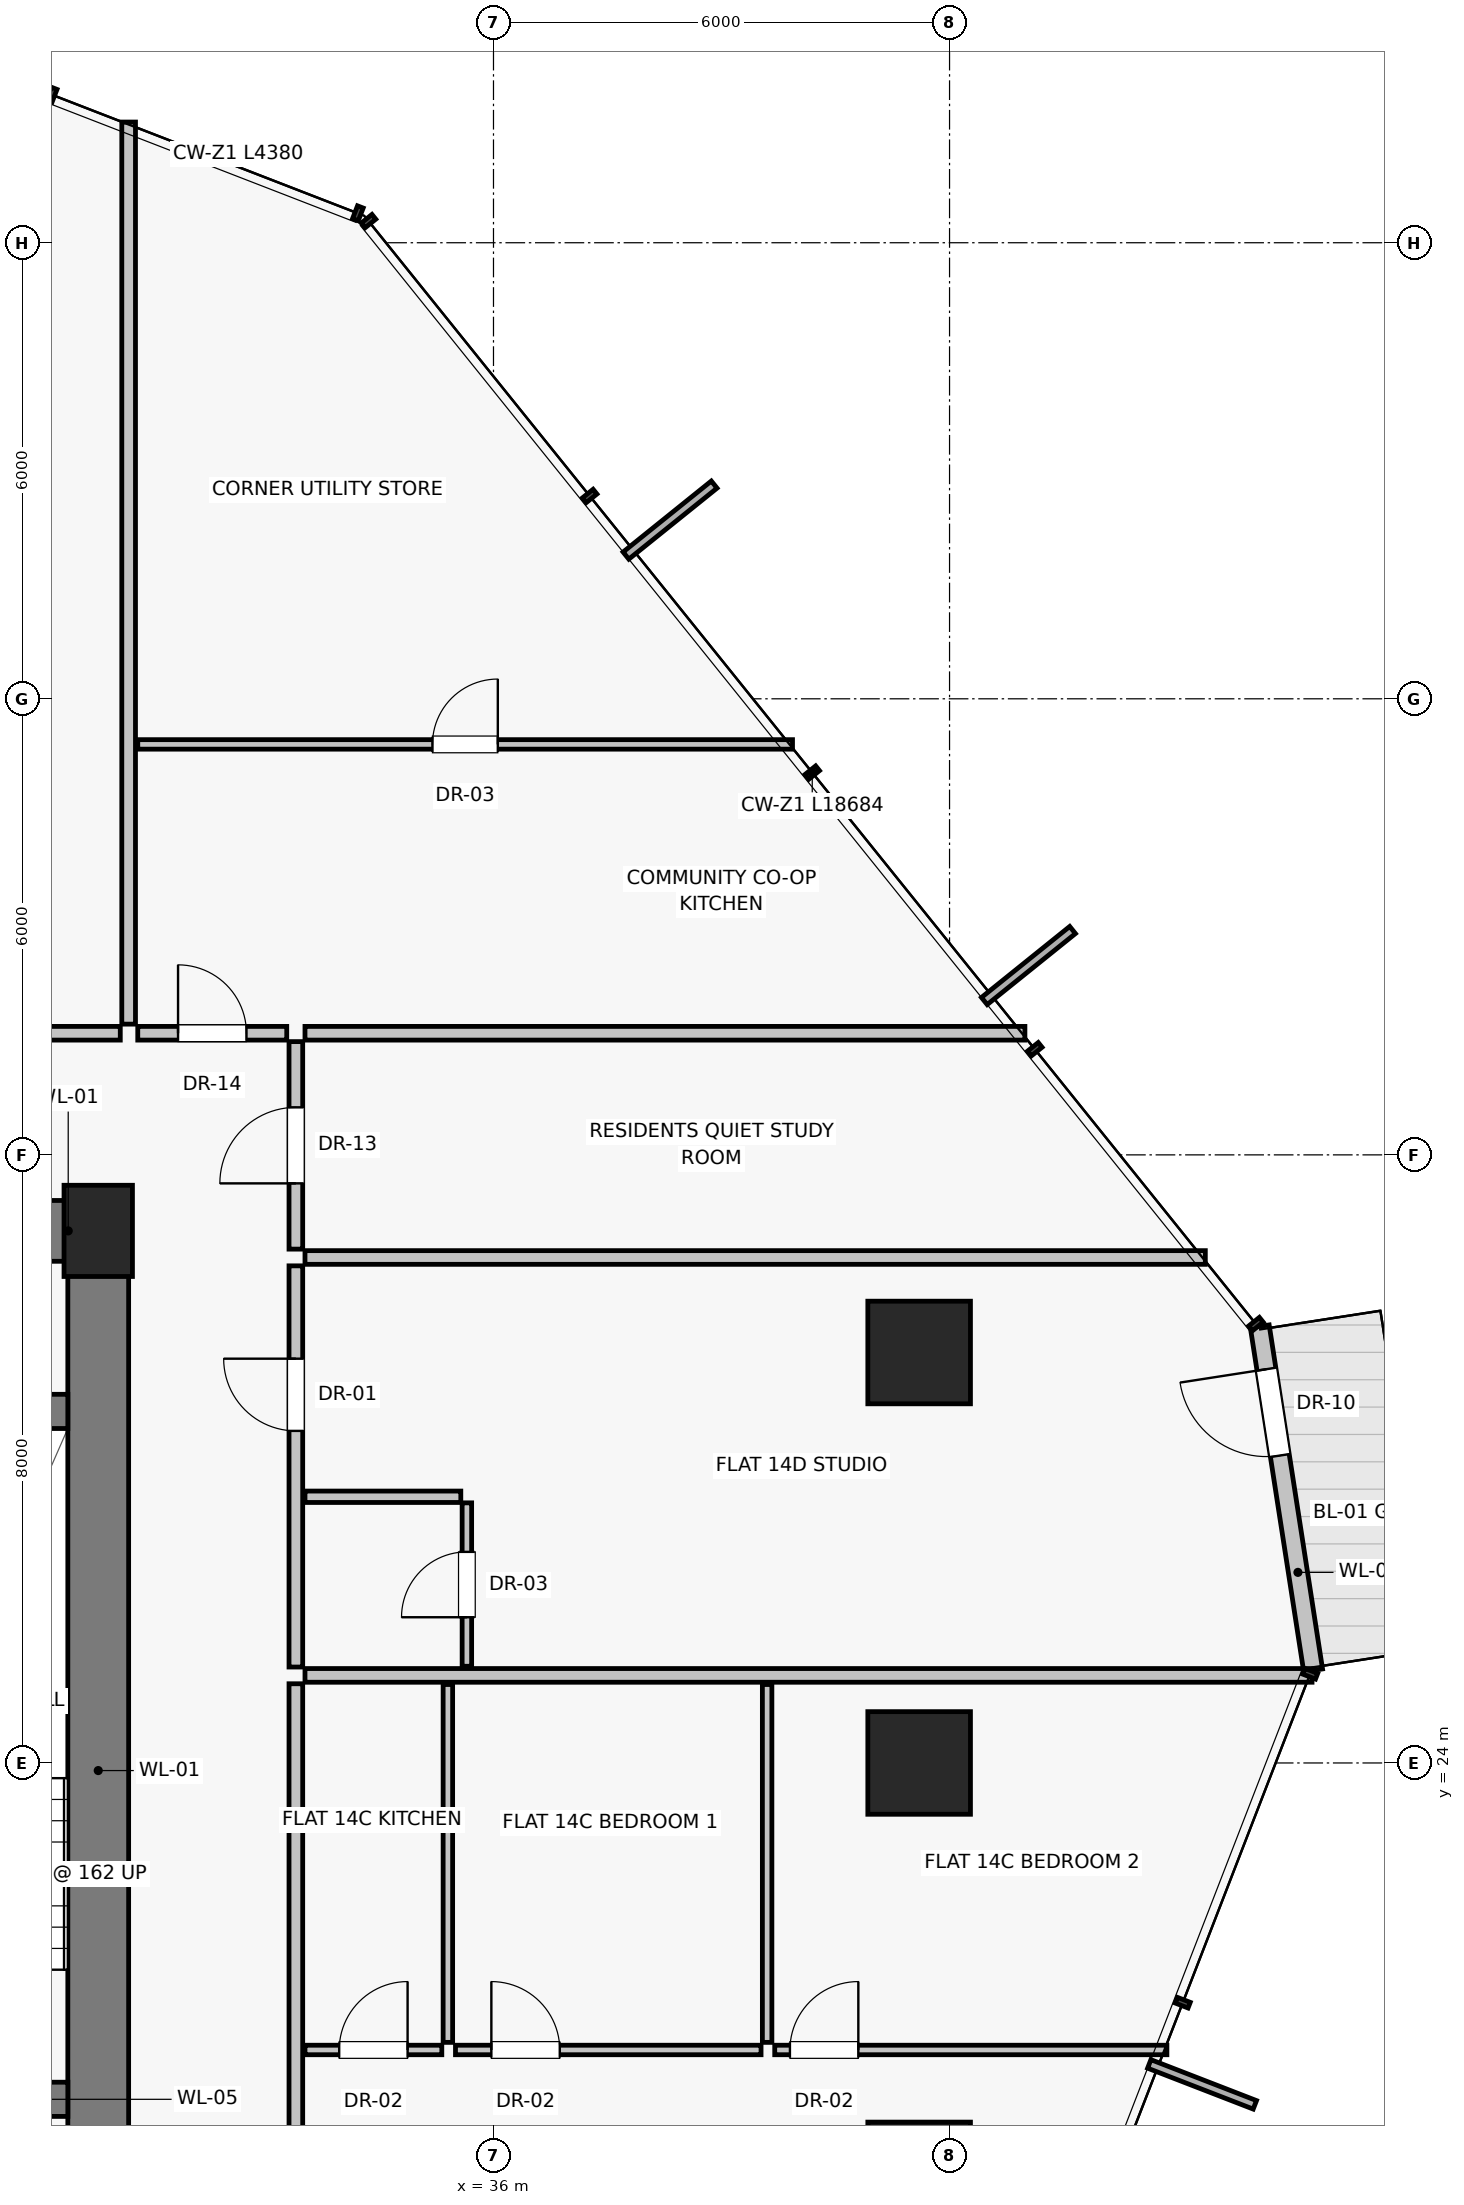
"""IFC4 building model, lengths in metres.
Left out: names, types, materials, properties, quantities, classifications, styles, units other than length and angle.
Written with IfcOpenShell. Run it as: python <this file> out.ifc"""

import sys

from ifc_helpers import new_model, si_unit, direction, frame, frame_2d, origin, origin_2d, place, context, subcontext, project, spatial, rectangle, extrude, source, transform, mapped, element, fill, save


model = new_model("IFC4")
c1 = context("Model", 3, precision=1e-05, world=origin(), true_north=direction((0.0, 1.0)))
c2 = subcontext(c1, "Body", "Model", "MODEL_VIEW")
j1 = project(units=[si_unit("LENGTHUNIT", "METRE"), si_unit("PLANEANGLEUNIT", "RADIAN")], contexts=[c1])
p1 = place(None, origin())
s1 = spatial("IfcSite", under=j1, at=p1, CompositionType="ELEMENT")
p2 = place(p1, origin())
s2 = spatial("IfcBuilding", under=s1, at=p2, CompositionType="ELEMENT")
p3 = place(p2, frame((0.0, 0.0, 53.3)))
s3 = spatial("IfcBuildingStorey", under=s2, at=p3, CompositionType="ELEMENT", Elevation=53.3)
p4 = place(p3, frame((30.8, 31.0, 0.0), z_axis=(0.0, 0.0, 1.0), x_axis=(1.0, 0.0, 0.0)))
e1 = element("IfcColumn", 1, at=p4, inside=s3, PredefinedType="PILASTER", context=c2, shape_type="SweptSolid", body=[
    extrude(rectangle(XDim=0.9, YDim=1.2, at=origin_2d()), origin(), (0.0, 0.0, 1.0), 3.25),
])
for number, where, z_axis, x_axis in (
    (2, (41.6, 18.6, 0.0), (0.0, 0.0, 1.0), (1.0, 0.0, 0.0)),
    (3, (41.6, 24.0, 0.0), (0.0, 0.0, 1.0), (1.0, 0.0, 0.0)),
    (4, (41.6, 29.4, 0.0), (0.0, 0.0, 1.0), (1.0, 0.0, 0.0)),
):
    element("IfcColumn", number, at=place(p3, frame(where, z_axis=z_axis, x_axis=x_axis)), inside=s3, PredefinedType="COLUMN", context=c2, shape_type="SweptSolid", body=[
        extrude(rectangle(XDim=1.35, YDim=1.35, at=origin_2d()), origin(), (0.0, 0.0, 1.0), 3.25),
    ])
p5 = place(p3, frame((46.784, 25.218, 0.0), z_axis=(0.0, 0.0, 1.0), x_axis=(-0.153366947005, 0.988169307136, 0.0)))
e5 = element("IfcWall", 5, at=p5, inside=s3, PredefinedType="SOLIDWALL", context=c2, shape_type="SweptSolid", body=[
    extrude(rectangle(XDim=4.58, YDim=0.25, at=frame_2d((2.29, 0.0))), origin(), (0.0, 0.0, 1.0), 2.97),
])
p6 = place(p5, frame((2.86, 0.0, 0.0)))
e6 = element("IfcOpeningElement", 6, at=p6, cuts=e5, PredefinedType="OPENING", context=c2, shape_type="SweptSolid", body=[
    extrude(rectangle(XDim=1.15, YDim=2.25, at=frame_2d((0.575, 1.125))), frame((0.0, 0.135, 0.0), z_axis=(0.0, -1.0, 0.0), x_axis=(1.0, 0.0, 0.0)), (0.0, 0.0, 1.0), 0.27),
])
p7 = place(p3, frame((30.8, 16.8, 0.0), z_axis=(0.0, 0.0, 1.0), x_axis=(0.0, 1.0, 0.0)))
e7 = element("IfcWall", 7, at=p7, inside=s3, PredefinedType="SHEAR", context=c2, shape_type="SweptSolid", body=[
    extrude(rectangle(XDim=14.2, YDim=0.8, at=frame_2d((7.1, 0.0))), origin(), (0.0, 0.0, 1.0), 2.97),
])
p8 = place(p3, frame((27.0, 31.0, 0.0), z_axis=(0.0, 0.0, 1.0), x_axis=(1.0, 0.0, 0.0)))
e8 = element("IfcWall", 8, at=p8, inside=s3, PredefinedType="SHEAR", context=c2, shape_type="SweptSolid", body=[
    extrude(rectangle(XDim=3.8, YDim=0.8, at=frame_2d((1.9, 0.0))), origin(), (0.0, 0.0, 1.0), 2.97),
])
p9 = place(p8, frame((0.45, 0.0, 0.0)))
e9 = element("IfcOpeningElement", 9, at=p9, cuts=e8, PredefinedType="OPENING", context=c2, shape_type="SweptSolid", body=[
    extrude(rectangle(XDim=0.86, YDim=2.01, at=frame_2d((0.43, 1.005))), frame((0.0, 0.41, 0.0), z_axis=(0.0, -1.0, 0.0), x_axis=(1.0, 0.0, 0.0)), (0.0, 0.0, 1.0), 0.82),
])
p10 = place(p8, frame((1.9, 0.0, 0.0)))
e10 = element("IfcOpeningElement", 10, at=p10, cuts=e8, PredefinedType="OPENING", context=c2, shape_type="SweptSolid", body=[
    extrude(rectangle(XDim=0.86, YDim=2.01, at=frame_2d((0.43, 1.005))), frame((0.0, 0.41, 0.0), z_axis=(0.0, -1.0, 0.0), x_axis=(1.0, 0.0, 0.0)), (0.0, 0.0, 1.0), 0.82),
])
p11 = place(p3, frame((26.975, 19.575, 0.0), z_axis=(0.0, 0.0, 1.0), x_axis=(1.0, 0.0, 0.0)))
e11 = element("IfcWall", 11, at=p11, inside=s3, PredefinedType="SHEAR", context=c2, shape_type="SweptSolid", body=[
    extrude(rectangle(XDim=3.425, YDim=0.45, at=frame_2d((1.712, 0.0))), origin(), (0.0, 0.0, 1.0), 2.97),
])
p12 = place(p11, frame((1.05, 0.0, 0.0)))
e12 = element("IfcOpeningElement", 12, at=p12, cuts=e11, PredefinedType="OPENING", context=c2, shape_type="SweptSolid", body=[
    extrude(rectangle(XDim=1.1, YDim=2.03, at=frame_2d((0.55, 1.015))), frame((0.0, 0.235, 0.0), z_axis=(0.0, -1.0, 0.0), x_axis=(1.0, 0.0, 0.0)), (0.0, 0.0, 1.0), 0.47),
])
p13 = place(p3, frame((26.975, 28.625, 0.0), z_axis=(0.0, 0.0, 1.0), x_axis=(1.0, 0.0, 0.0)))
e13 = element("IfcWall", 13, at=p13, inside=s3, PredefinedType="SHEAR", context=c2, shape_type="SweptSolid", body=[
    extrude(rectangle(XDim=3.425, YDim=0.45, at=frame_2d((1.712, 0.0))), origin(), (0.0, 0.0, 1.0), 2.97),
])
p14 = place(p3, frame((31.2, 33.72, 0.0), z_axis=(0.0, 0.0, 1.0), x_axis=(0.0, 1.0, 0.0)))
e14 = element("IfcWall", 14, at=p14, inside=s3, PredefinedType="PARTITIONING", context=c2, shape_type="SweptSolid", body=[
    extrude(rectangle(XDim=11.868, YDim=0.18, at=frame_2d((5.934, 0.0))), origin(), (0.0, 0.0, 1.0), 2.97),
])
p15 = place(p3, frame((24.11, 33.6, 0.0), z_axis=(0.0, 0.0, 1.0), x_axis=(1.0, 0.0, 0.0)))
e15 = element("IfcWall", 15, at=p15, inside=s3, PredefinedType="PARTITIONING", context=c2, shape_type="SweptSolid", body=[
    extrude(rectangle(XDim=6.98, YDim=0.18, at=frame_2d((3.49, 0.0))), origin(), (0.0, 0.0, 1.0), 2.97),
])
p16 = place(p15, frame((2.99, 0.0, 0.0)))
e16 = element("IfcOpeningElement", 16, at=p16, cuts=e15, PredefinedType="OPENING", context=c2, shape_type="SweptSolid", body=[
    extrude(rectangle(XDim=1.0, YDim=2.01, at=frame_2d((0.5, 1.005))), frame((0.0, 0.1, 0.0), z_axis=(0.0, -1.0, 0.0), x_axis=(1.0, 0.0, 0.0)), (0.0, 0.0, 1.0), 0.2),
])
p17 = place(p3, frame((33.52, 33.6, 0.0), z_axis=(0.0, 0.0, 1.0), x_axis=(1.0, 0.0, 0.0)))
e17 = element("IfcWall", 17, at=p17, inside=s3, PredefinedType="PARTITIONING", context=c2, shape_type="SweptSolid", body=[
    extrude(rectangle(XDim=9.471, YDim=0.18, at=frame_2d((4.736, 0.0))), origin(), (0.0, 0.0, 1.0), 2.97),
])
p18 = place(p3, frame((33.4, 14.31, 0.0), z_axis=(0.0, 0.0, 1.0), x_axis=(0.0, 1.0, 0.0)))
e18 = element("IfcWall", 18, at=p18, inside=s3, PredefinedType="PARTITIONING", context=c2, shape_type="SweptSolid", body=[
    extrude(rectangle(XDim=10.732, YDim=0.18, at=frame_2d((5.366, 0.0))), origin(), (0.0, 0.0, 1.0), 2.97),
])
p19 = place(p18, frame((3.552, 0.0, 0.0)))
e19 = element("IfcOpeningElement", 19, at=p19, cuts=e18, PredefinedType="OPENING", context=c2, shape_type="SweptSolid", body=[
    extrude(rectangle(XDim=0.95, YDim=2.02, at=frame_2d((0.475, 1.01))), frame((0.0, 0.1, 0.0), z_axis=(0.0, -1.0, 0.0), x_axis=(1.0, 0.0, 0.0)), (0.0, 0.0, 1.0), 0.2),
])
p20 = place(p3, frame((33.52, 20.224, 0.0), z_axis=(0.0, 0.0, 1.0), x_axis=(1.0, 0.0, 0.0)))
e20 = element("IfcWall", 20, at=p20, inside=s3, PredefinedType="PARTITIONING", context=c2, shape_type="SweptSolid", body=[
    extrude(rectangle(XDim=1.8, YDim=0.125, at=frame_2d((0.9, 0.0))), origin(), (0.0, 0.0, 1.0), 2.97),
])
p21 = place(p20, frame((0.45, 0.0, 0.0)))
e21 = element("IfcOpeningElement", 21, at=p21, cuts=e20, PredefinedType="OPENING", context=c2, shape_type="SweptSolid", body=[
    extrude(rectangle(XDim=0.9, YDim=2.01, at=frame_2d((0.45, 1.005))), frame((0.0, 0.073, 0.0), z_axis=(0.0, -1.0, 0.0), x_axis=(1.0, 0.0, 0.0)), (0.0, 0.0, 1.0), 0.145),
])
for number, where, z_axis, x_axis in (
    (22, (35.4, 20.324, 0.0), (0.0, 0.0, 1.0), (0.0, 1.0, 0.0)),
    (23, (39.6, 20.324, 0.0), (0.0, 0.0, 1.0), (0.0, 1.0, 0.0)),
):
    element("IfcWall", number, at=place(p3, frame(where, z_axis=z_axis, x_axis=x_axis)), inside=s3, PredefinedType="PARTITIONING", context=c2, shape_type="SweptSolid", body=[
        extrude(rectangle(XDim=4.708, YDim=0.125, at=frame_2d((2.354, 0.0))), origin(), (0.0, 0.0, 1.0), 2.97),
    ])
p22 = place(p3, frame((35.5, 20.224, 0.0), z_axis=(0.0, 0.0, 1.0), x_axis=(1.0, 0.0, 0.0)))
e24 = element("IfcWall", 24, at=p22, inside=s3, PredefinedType="PARTITIONING", context=c2, shape_type="SweptSolid", body=[
    extrude(rectangle(XDim=4.02, YDim=0.125, at=frame_2d((2.01, 0.0))), origin(), (0.0, 0.0, 1.0), 2.97),
])
p23 = place(p22, frame((0.472, 0.0, 0.0)))
e25 = element("IfcOpeningElement", 25, at=p23, cuts=e24, PredefinedType="OPENING", context=c2, shape_type="SweptSolid", body=[
    extrude(rectangle(XDim=0.9, YDim=2.01, at=frame_2d((0.45, 1.005))), frame((0.0, 0.073, 0.0), z_axis=(0.0, -1.0, 0.0), x_axis=(1.0, 0.0, 0.0)), (0.0, 0.0, 1.0), 0.145),
])
p24 = place(p3, frame((39.7, 20.224, 0.0), z_axis=(0.0, 0.0, 1.0), x_axis=(1.0, 0.0, 0.0)))
e26 = element("IfcWall", 26, at=p24, inside=s3, PredefinedType="PARTITIONING", context=c2, shape_type="SweptSolid", body=[
    extrude(rectangle(XDim=5.159, YDim=0.125, at=frame_2d((2.58, 0.0))), origin(), (0.0, 0.0, 1.0), 2.97),
])
p25 = place(p24, frame((0.2, 0.0, 0.0)))
e27 = element("IfcOpeningElement", 27, at=p25, cuts=e26, PredefinedType="OPENING", context=c2, shape_type="SweptSolid", body=[
    extrude(rectangle(XDim=0.9, YDim=2.01, at=frame_2d((0.45, 1.005))), frame((0.0, 0.073, 0.0), z_axis=(0.0, -1.0, 0.0), x_axis=(1.0, 0.0, 0.0)), (0.0, 0.0, 1.0), 0.145),
])
p26 = place(p3, frame((33.52, 25.152, 0.0), z_axis=(0.0, 0.0, 1.0), x_axis=(1.0, 0.0, 0.0)))
e28 = element("IfcWall", 28, at=p26, inside=s3, PredefinedType="PARTITIONING", context=c2, shape_type="SweptSolid", body=[
    extrude(rectangle(XDim=13.249, YDim=0.18, at=frame_2d((6.625, 0.0))), origin(), (0.0, 0.0, 1.0), 2.97),
])
p27 = place(p3, frame((33.4, 30.76, 0.0), z_axis=(0.0, 0.0, 1.0), x_axis=(0.0, 1.0, 0.0)))
e29 = element("IfcWall", 29, at=p27, inside=s3, PredefinedType="PARTITIONING", context=c2, shape_type="SweptSolid", body=[
    extrude(rectangle(XDim=2.73, YDim=0.18, at=frame_2d((1.365, 0.0))), origin(), (0.0, 0.0, 1.0), 2.97),
])
p28 = place(p27, frame((0.865, 0.0, 0.0)))
e30 = element("IfcOpeningElement", 30, at=p28, cuts=e29, PredefinedType="OPENING", context=c2, shape_type="SweptSolid", body=[
    extrude(rectangle(XDim=1.0, YDim=2.01, at=frame_2d((0.5, 1.005))), frame((0.0, 0.1, 0.0), z_axis=(0.0, -1.0, 0.0), x_axis=(1.0, 0.0, 0.0)), (0.0, 0.0, 1.0), 0.2),
])
p29 = place(p3, frame((33.52, 30.65, 0.0), z_axis=(0.0, 0.0, 1.0), x_axis=(1.0, 0.0, 0.0)))
e31 = element("IfcWall", 31, at=p29, inside=s3, PredefinedType="PARTITIONING", context=c2, shape_type="SweptSolid", body=[
    extrude(rectangle(XDim=11.845, YDim=0.18, at=frame_2d((5.922, 0.0))), origin(), (0.0, 0.0, 1.0), 2.269),
])
p30 = place(p3, frame((33.4, 25.262, 0.0), z_axis=(0.0, 0.0, 1.0), x_axis=(0.0, 1.0, 0.0)))
e32 = element("IfcWall", 32, at=p30, inside=s3, PredefinedType="PARTITIONING", context=c2, shape_type="SweptSolid", body=[
    extrude(rectangle(XDim=5.278, YDim=0.18, at=frame_2d((2.639, 0.0))), origin(), (0.0, 0.0, 1.0), 2.97),
])
p31 = place(p30, frame((3.107, 0.0, 0.0)))
e33 = element("IfcOpeningElement", 33, at=p31, cuts=e32, PredefinedType="OPENING", context=c2, shape_type="SweptSolid", body=[
    extrude(rectangle(XDim=0.95, YDim=2.02, at=frame_2d((0.475, 1.01))), frame((0.0, 0.1, 0.0), z_axis=(0.0, -1.0, 0.0), x_axis=(1.0, 0.0, 0.0)), (0.0, 0.0, 1.0), 0.2),
])
p32 = place(p3, frame((33.52, 27.502, 0.0), z_axis=(0.0, 0.0, 1.0), x_axis=(1.0, 0.0, 0.0)))
e34 = element("IfcWall", 34, at=p32, inside=s3, PredefinedType="PARTITIONING", context=c2, shape_type="SweptSolid", body=[
    extrude(rectangle(XDim=2.05, YDim=0.15, at=frame_2d((1.025, 0.0))), origin(), (0.0, 0.0, 1.0), 2.97),
])
p33 = place(p3, frame((35.65, 25.272, 0.0), z_axis=(0.0, 0.0, 1.0), x_axis=(0.0, 1.0, 0.0)))
e35 = element("IfcWall", 35, at=p33, inside=s3, PredefinedType="PARTITIONING", context=c2, shape_type="SweptSolid", body=[
    extrude(rectangle(XDim=2.15, YDim=0.125, at=frame_2d((1.075, 0.0))), origin(), (0.0, 0.0, 1.0), 2.97),
])
p34 = place(p33, frame((0.645, 0.0, 0.0)))
e36 = element("IfcOpeningElement", 36, at=p34, cuts=e35, PredefinedType="OPENING", context=c2, shape_type="SweptSolid", body=[
    extrude(rectangle(XDim=0.86, YDim=2.01, at=frame_2d((0.43, 1.005))), frame((0.0, 0.073, 0.0), z_axis=(0.0, -1.0, 0.0), x_axis=(1.0, 0.0, 0.0)), (0.0, 0.0, 1.0), 0.145),
])
p35 = place(p3, frame((31.32, 33.6, 0.0), z_axis=(0.0, 0.0, 1.0), x_axis=(1.0, 0.0, 0.0)))
e37 = element("IfcWall", 37, at=p35, inside=s3, PredefinedType="PARTITIONING", context=c2, shape_type="SweptSolid", body=[
    extrude(rectangle(XDim=1.96, YDim=0.18, at=frame_2d((0.98, 0.0))), origin(), (0.0, 0.0, 1.0), 2.97),
])
p36 = place(p35, frame((0.53, 0.0, 0.0)))
e38 = element("IfcOpeningElement", 38, at=p36, cuts=e37, PredefinedType="OPENING", context=c2, shape_type="SweptSolid", body=[
    extrude(rectangle(XDim=0.9, YDim=2.01, at=frame_2d((0.45, 1.005))), frame((0.0, 0.1, 0.0), z_axis=(0.0, -1.0, 0.0), x_axis=(1.0, 0.0, 0.0)), (0.0, 0.0, 1.0), 0.2),
])
p37 = place(p3, frame((31.32, 37.4, 0.0), z_axis=(0.0, 0.0, 1.0), x_axis=(1.0, 0.0, 0.0)))
e39 = element("IfcWall", 39, at=p37, inside=s3, PredefinedType="PARTITIONING", context=c2, shape_type="SweptSolid", body=[
    extrude(rectangle(XDim=8.614, YDim=0.125, at=frame_2d((4.307, 0.0))), origin(), (0.0, 0.0, 1.0), 2.97),
])
p38 = place(p37, frame((3.877, 0.0, 0.0)))
e40 = element("IfcOpeningElement", 40, at=p38, cuts=e39, PredefinedType="OPENING", context=c2, shape_type="SweptSolid", body=[
    extrude(rectangle(XDim=0.86, YDim=2.01, at=frame_2d((0.43, 1.005))), frame((0.0, 0.073, 0.0), z_axis=(0.0, -1.0, 0.0), x_axis=(1.0, 0.0, 0.0)), (0.0, 0.0, 1.0), 0.145),
])
m1 = source(origin(), c2, "Body", "SweptSolid", [
    extrude(rectangle(XDim=1.15, YDim=2.25, at=frame_2d((0.575, 1.125))), frame((0.0, 0.025, 0.0), z_axis=(0.0, -1.0, 0.0), x_axis=(1.0, 0.0, 0.0)), (0.0, 0.0, 1.0), 0.05),
])
p39 = place(p6, frame((1.15, 0.0, 0.0), z_axis=(0.0, 0.0, 1.0), x_axis=(-1.0, 0.0, 0.0)))
e41 = element("IfcDoor", 41, at=p39, inside=s3, OperationType="SINGLE_SWING_RIGHT", PredefinedType="DOOR", context=c2, shape_type="MappedRepresentation", body=[
    mapped(m1, transform((0.0, 0.0, 0.0), scale=1.0)),
])
fill(e6, e41)
m2 = source(origin(), c2, "Body", "SweptSolid", [
    extrude(rectangle(XDim=0.9, YDim=2.01, at=frame_2d((0.45, 1.005))), frame((0.0, 0.025, 0.0), z_axis=(0.0, -1.0, 0.0), x_axis=(1.0, 0.0, 0.0)), (0.0, 0.0, 1.0), 0.05),
])
p40 = place(p21, origin())
e42 = element("IfcDoor", 42, at=p40, inside=s3, OperationType="SINGLE_SWING_RIGHT", PredefinedType="DOOR", context=c2, shape_type="MappedRepresentation", body=[
    mapped(m2, transform((0.0, 0.0, 0.0), scale=1.0)),
])
fill(e21, e42)
p41 = place(p23, origin())
e43 = element("IfcDoor", 43, at=p41, inside=s3, OperationType="SINGLE_SWING_LEFT", PredefinedType="DOOR", context=c2, shape_type="MappedRepresentation", body=[
    mapped(m2, transform((0.0, 0.0, 0.0), scale=1.0)),
])
fill(e25, e43)
p42 = place(p25, origin())
e44 = element("IfcDoor", 44, at=p42, inside=s3, OperationType="SINGLE_SWING_RIGHT", PredefinedType="DOOR", context=c2, shape_type="MappedRepresentation", body=[
    mapped(m2, transform((0.0, 0.0, 0.0), scale=1.0)),
])
fill(e27, e44)
m3 = source(origin(), c2, "Body", "SweptSolid", [
    extrude(rectangle(XDim=1.0, YDim=2.01, at=frame_2d((0.5, 1.005))), frame((0.0, 0.025, 0.0), z_axis=(0.0, -1.0, 0.0), x_axis=(1.0, 0.0, 0.0)), (0.0, 0.0, 1.0), 0.05),
])
p43 = place(p28, origin())
e45 = element("IfcDoor", 45, at=p43, inside=s3, OperationType="SINGLE_SWING_LEFT", PredefinedType="DOOR", context=c2, shape_type="MappedRepresentation", body=[
    mapped(m3, transform((0.0, 0.0, 0.0), scale=1.0)),
])
fill(e30, e45)
m4 = source(origin(), c2, "Body", "SweptSolid", [
    extrude(rectangle(XDim=0.95, YDim=2.02, at=frame_2d((0.475, 1.01))), frame((0.0, 0.025, 0.0), z_axis=(0.0, -1.0, 0.0), x_axis=(1.0, 0.0, 0.0)), (0.0, 0.0, 1.0), 0.05),
])
p44 = place(p31, origin())
e46 = element("IfcDoor", 46, at=p44, inside=s3, OperationType="SINGLE_SWING_RIGHT", PredefinedType="DOOR", context=c2, shape_type="MappedRepresentation", body=[
    mapped(m4, transform((0.0, 0.0, 0.0), scale=1.0)),
])
fill(e33, e46)
m5 = source(origin(), c2, "Body", "SweptSolid", [
    extrude(rectangle(XDim=0.86, YDim=2.01, at=frame_2d((0.43, 1.005))), frame((0.0, 0.025, 0.0), z_axis=(0.0, -1.0, 0.0), x_axis=(1.0, 0.0, 0.0)), (0.0, 0.0, 1.0), 0.05),
])
p45 = place(p34, origin())
e47 = element("IfcDoor", 47, at=p45, inside=s3, OperationType="SINGLE_SWING_LEFT", PredefinedType="DOOR", context=c2, shape_type="MappedRepresentation", body=[
    mapped(m5, transform((0.0, 0.0, 0.0), scale=1.0)),
])
fill(e36, e47)
p46 = place(p36, origin())
e48 = element("IfcDoor", 48, at=p46, inside=s3, OperationType="SINGLE_SWING_LEFT", PredefinedType="DOOR", context=c2, shape_type="MappedRepresentation", body=[
    mapped(m2, transform((0.0, 0.0, 0.0), scale=1.0)),
])
fill(e38, e48)
p47 = place(p38, origin())
e49 = element("IfcDoor", 49, at=p47, inside=s3, OperationType="SINGLE_SWING_RIGHT", PredefinedType="DOOR", context=c2, shape_type="MappedRepresentation", body=[
    mapped(m5, transform((0.0, 0.0, 0.0), scale=1.0)),
])
fill(e40, e49)
save(model, sys.argv[1])
